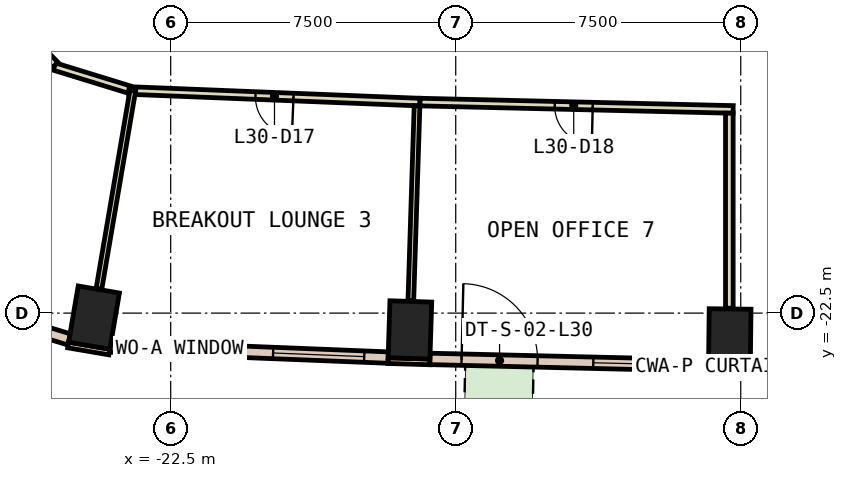
"""IFC4 building model, lengths in metres.
Left out: names, types, materials, properties, quantities, classifications, styles, units other than length and angle.
Written with IfcOpenShell. Run it as: python <this file> out.ifc"""

import sys

from ifc_helpers import new_model, si_unit, direction, frame, frame_2d, origin, origin_2d, place, context, subcontext, project, spatial, rectangle, extrude, element, fill, save


model = new_model("IFC4")
c1 = context("Model", 3, precision=1e-05, world=origin(), true_north=direction((0.0, 1.0)))
c2 = subcontext(c1, "Body", "Model", "MODEL_VIEW")
j1 = project(units=[si_unit("LENGTHUNIT", "METRE"), si_unit("PLANEANGLEUNIT", "RADIAN")], contexts=[c1])
p1 = place(None, origin())
s1 = spatial("IfcSite", under=j1, at=p1, CompositionType="ELEMENT")
p2 = place(p1, origin())
s2 = spatial("IfcBuilding", under=s1, at=p2, CompositionType="ELEMENT")
p3 = place(p2, frame((0.0, 0.0, 138.2)))
s3 = spatial("IfcBuildingStorey", under=s2, at=p3, CompositionType="ELEMENT", Elevation=138.2)
for number, where, z_axis, x_axis in (
    (1, (-24.518, -22.618, 0.0), (0.0, 0.0, 1.0), (-0.986, 0.168, 0.0)),
    (2, (-16.205, -22.942, 0.0), (0.0, 0.0, 1.0), (-0.999, 0.032, 0.0)),
    (3, (-7.789, -23.141, 0.0), (0.0, 0.0, 1.0), (-1.0, 0.012, 0.0)),
):
    element("IfcColumn", number, at=place(p3, frame(where, z_axis=z_axis, x_axis=x_axis)), inside=s3, PredefinedType="COLUMN", context=c2, shape_type="SweptSolid", body=[
        extrude(rectangle(XDim=1.1, YDim=1.5, at=origin_2d()), origin(), (0.0, 0.0, 1.0), 3.8),
    ])
p4 = place(p3, frame((-25.199, -23.339, 0.0), z_axis=(0.0, 0.0, 1.0), x_axis=(0.985800082077, -0.167923191299, 0.0)))
e4 = element("IfcWall", 4, at=p4, inside=s3, PredefinedType="STANDARD", context=c2, shape_type="SweptSolid", body=[
    extrude(rectangle(XDim=1.101, YDim=0.15, at=frame_2d((0.55, 0.0))), origin(), (0.0, 0.0, 1.0), 3.8),
])
p5 = place(p3, frame((-16.781, -23.75, 0.0), z_axis=(0.0, 0.0, 1.0), x_axis=(0.999523702549, -0.030860460829, 0.0)))
e5 = element("IfcWall", 5, at=p5, inside=s3, PredefinedType="STANDARD", context=c2, shape_type="SweptSolid", body=[
    extrude(rectangle(XDim=1.1, YDim=0.15, at=frame_2d((0.55, 0.0))), origin(), (0.0, 0.0, 1.0), 3.8),
])
p6 = place(p3, frame((-8.349, -23.96, 0.0), z_axis=(0.0, 0.0, 1.0), x_axis=(0.999940879068, -0.010873746799, 0.0)))
e6 = element("IfcWall", 6, at=p6, inside=s3, PredefinedType="STANDARD", context=c2, shape_type="SweptSolid", body=[
    extrude(rectangle(XDim=1.1, YDim=0.15, at=frame_2d((0.55, 0.0))), origin(), (0.0, 0.0, 1.0), 3.8),
])
p7 = place(p3, frame((-24.09, -23.378, 0.0), z_axis=(0.0, 0.0, 1.0), x_axis=(0.999203621229, -0.039901420066, 0.0)))
e7 = element("IfcWall", 7, at=p7, inside=s3, PredefinedType="STANDARD", context=c2, shape_type="SweptSolid", body=[
    extrude(rectangle(XDim=7.318, YDim=0.3, at=frame_2d((3.659, 0.0))), origin(), (0.0, 0.0, 1.0), 3.8),
])
p8 = place(p7, frame((0.629, 0.0, 0.9)))
e8 = element("IfcOpeningElement", 8, at=p8, cuts=e7, PredefinedType="OPENING", context=c2, shape_type="SweptSolid", body=[
    extrude(rectangle(XDim=2.4, YDim=2.6, at=frame_2d((1.2, 1.3))), frame((0.0, 0.16, 0.0), z_axis=(0.0, -1.0, 0.0), x_axis=(1.0, 0.0, 0.0)), (0.0, 0.0, 1.0), 0.32),
])
p9 = place(p7, frame((4.288, 0.0, 0.9)))
e9 = element("IfcOpeningElement", 9, at=p9, cuts=e7, PredefinedType="OPENING", context=c2, shape_type="SweptSolid", body=[
    extrude(rectangle(XDim=2.4, YDim=2.6, at=frame_2d((1.2, 1.3))), frame((0.0, 0.16, 0.0), z_axis=(0.0, -1.0, 0.0), x_axis=(1.0, 0.0, 0.0)), (0.0, 0.0, 1.0), 0.32),
])
p10 = place(p3, frame((-15.68, -23.705, 0.0), z_axis=(0.0, 0.0, 1.0), x_axis=(0.999722302867, -0.023565168146, 0.0)))
e10 = element("IfcWall", 10, at=p10, inside=s3, PredefinedType="STANDARD", context=c2, shape_type="SweptSolid", body=[
    extrude(rectangle(XDim=7.335, YDim=0.3, at=frame_2d((3.667, 0.0))), origin(), (0.0, 0.0, 1.0), 3.8),
])
p11 = place(p10, frame((0.834, 0.0, 0.0)))
e11 = element("IfcOpeningElement", 11, at=p11, cuts=e10, PredefinedType="OPENING", context=c2, shape_type="SweptSolid", body=[
    extrude(rectangle(XDim=2.0, YDim=2.4, at=frame_2d((1.0, 1.2))), frame((0.0, 0.16, 0.0), z_axis=(0.0, -1.0, 0.0), x_axis=(1.0, 0.0, 0.0)), (0.0, 0.0, 1.0), 0.32),
])
p12 = place(p10, frame((4.301, 0.0, 0.9)))
e12 = element("IfcOpeningElement", 12, at=p12, cuts=e10, PredefinedType="OPENING", context=c2, shape_type="SweptSolid", body=[
    extrude(rectangle(XDim=2.4, YDim=2.6, at=frame_2d((1.2, 1.3))), frame((0.0, 0.16, 0.0), z_axis=(0.0, -1.0, 0.0), x_axis=(1.0, 0.0, 0.0)), (0.0, 0.0, 1.0), 0.32),
])
p13 = place(p3, frame((-28.554, -22.154, 0.0), z_axis=(0.0, 0.0, 1.0), x_axis=(0.955874475611, -0.293775402094, 0.0)))
e13 = element("IfcWall", 13, at=p13, inside=s3, PredefinedType="STANDARD", context=c2, shape_type="SweptSolid", body=[
    extrude(rectangle(XDim=3.537, YDim=0.3, at=frame_2d((1.769, 0.0))), origin(), (0.0, 0.0, 1.0), 3.8),
])
p14 = place(p13, frame((1.069, 0.0, 0.9)))
e14 = element("IfcOpeningElement", 14, at=p14, cuts=e13, PredefinedType="OPENING", context=c2, shape_type="SweptSolid", body=[
    extrude(rectangle(XDim=1.4, YDim=2.6, at=frame_2d((0.7, 1.3))), frame((0.0, 0.16, 0.0), z_axis=(0.0, -1.0, 0.0), x_axis=(1.0, 0.0, 0.0)), (0.0, 0.0, 1.0), 0.32),
])
p15 = place(p3, frame((-23.594, -16.617, 0.0), z_axis=(0.0, 0.0, 1.0), x_axis=(-0.955896815358, 0.293702704087, 0.0)))
e15 = element("IfcWall", 15, at=p15, inside=s3, PredefinedType="PARTITIONING", context=c2, shape_type="SweptSolid", body=[
    extrude(rectangle(XDim=2.06, YDim=0.2, at=frame_2d((1.03, 0.0))), origin(), (0.0, 0.0, 1.0), 3.8),
])
p16 = place(p3, frame((-25.538, -15.97, 0.0), z_axis=(0.0, 0.0, 1.0), x_axis=(-0.698272822523, 0.715831729756, 0.0)))
e16 = element("IfcWall", 16, at=p16, inside=s3, PredefinedType="PARTITIONING", context=c2, shape_type="SweptSolid", body=[
    extrude(rectangle(XDim=1.196, YDim=0.2, at=frame_2d((0.598, 0.0))), origin(), (0.0, 0.0, 1.0), 3.8),
])
p17 = place(p3, frame((-15.94, -16.948, 0.0), z_axis=(0.0, 0.0, 1.0), x_axis=(-0.999203094545, 0.03991460699, 0.0)))
e17 = element("IfcWall", 17, at=p17, inside=s3, PredefinedType="PARTITIONING", context=c2, shape_type="SweptSolid", body=[
    extrude(rectangle(XDim=7.664, YDim=0.2, at=frame_2d((3.832, 0.0))), origin(), (0.0, 0.0, 1.0), 3.8),
])
p18 = place(p17, frame((3.332, 0.0, 0.0)))
e18 = element("IfcOpeningElement", 18, at=p18, cuts=e17, PredefinedType="OPENING", context=c2, shape_type="SweptSolid", body=[
    extrude(rectangle(XDim=1.0, YDim=2.1, at=frame_2d((0.5, 1.05))), frame((0.0, 0.11, 0.0), z_axis=(0.0, -1.0, 0.0), x_axis=(1.0, 0.0, 0.0)), (0.0, 0.0, 1.0), 0.22),
])
p19 = place(p3, frame((-7.7, -17.141, 0.0), z_axis=(0.0, 0.0, 1.0), x_axis=(-0.999722699727, 0.023548325865, 0.0)))
e19 = element("IfcWall", 19, at=p19, inside=s3, PredefinedType="PARTITIONING", context=c2, shape_type="SweptSolid", body=[
    extrude(rectangle(XDim=8.242, YDim=0.2, at=frame_2d((4.121, 0.0))), origin(), (0.0, 0.0, 1.0), 3.8),
])
p20 = place(p19, frame((3.696, 0.0, 0.0)))
e20 = element("IfcOpeningElement", 20, at=p20, cuts=e19, PredefinedType="OPENING", context=c2, shape_type="SweptSolid", body=[
    extrude(rectangle(XDim=1.0, YDim=2.1, at=frame_2d((0.5, 1.05))), frame((0.0, 0.11, 0.0), z_axis=(0.0, -1.0, 0.0), x_axis=(1.0, 0.0, 0.0)), (0.0, 0.0, 1.0), 0.22),
])
p21 = place(p3, frame((-7.8, -22.371, 0.0), z_axis=(0.0, 0.0, 1.0), x_axis=(0.0, 1.0, 0.0)))
e21 = element("IfcWall", 21, at=p21, inside=s3, PredefinedType="PARTITIONING", context=c2, shape_type="SweptSolid", body=[
    extrude(rectangle(XDim=5.132, YDim=0.2, at=frame_2d((2.566, 0.0))), origin(), (0.0, 0.0, 1.0), 3.8),
])
p22 = place(p3, frame((-23.498, -16.646, 0.0), z_axis=(0.0, 0.0, 1.0), x_axis=(-0.168275674737, -0.985739974482, 0.0)))
e22 = element("IfcWall", 22, at=p22, inside=s3, PredefinedType="PARTITIONING", context=c2, shape_type="SweptSolid", body=[
    extrude(rectangle(XDim=5.288, YDim=0.15, at=frame_2d((2.644, 0.0))), origin(), (0.0, 0.0, 1.0), 3.8),
])
p23 = place(p3, frame((-16.018, -17.045, 0.0), z_axis=(0.0, 0.0, 1.0), x_axis=(-0.031744385759, -0.999496019988, 0.0)))
e23 = element("IfcWall", 23, at=p23, inside=s3, PredefinedType="PARTITIONING", context=c2, shape_type="SweptSolid", body=[
    extrude(rectangle(XDim=5.13, YDim=0.15, at=frame_2d((2.565, 0.0))), origin(), (0.0, 0.0, 1.0), 3.8),
])
p24 = place(p8, origin())
e24 = element("IfcWindow", 24, at=p24, inside=s3, PartitioningType="SINGLE_PANEL", PredefinedType="WINDOW", context=c2, shape_type="SweptSolid", body=[
    extrude(rectangle(XDim=2.4, YDim=2.6, at=frame_2d((1.2, 1.3))), frame((0.0, 0.03, 0.0), z_axis=(0.0, -1.0, 0.0), x_axis=(1.0, 0.0, 0.0)), (0.0, 0.0, 1.0), 0.06),
])
fill(e8, e24)
p25 = place(p9, origin())
e25 = element("IfcWindow", 25, at=p25, inside=s3, PartitioningType="SINGLE_PANEL", PredefinedType="WINDOW", context=c2, shape_type="SweptSolid", body=[
    extrude(rectangle(XDim=2.4, YDim=2.6, at=frame_2d((1.2, 1.3))), frame((0.0, 0.03, 0.0), z_axis=(0.0, -1.0, 0.0), x_axis=(1.0, 0.0, 0.0)), (0.0, 0.0, 1.0), 0.06),
])
fill(e9, e25)
p26 = place(p11, origin())
e26 = element("IfcDoor", 26, at=p26, inside=s3, OperationType="SLIDING_TO_LEFT", PredefinedType="DOOR", context=c2, shape_type="SweptSolid", body=[
    extrude(rectangle(XDim=2.0, YDim=2.4, at=frame_2d((1.0, 1.2))), frame((0.0, 0.025, 0.0), z_axis=(0.0, -1.0, 0.0), x_axis=(1.0, 0.0, 0.0)), (0.0, 0.0, 1.0), 0.05),
])
fill(e11, e26)
p27 = place(p12, origin())
e27 = element("IfcWindow", 27, at=p27, inside=s3, PartitioningType="SINGLE_PANEL", PredefinedType="WINDOW", context=c2, shape_type="SweptSolid", body=[
    extrude(rectangle(XDim=2.4, YDim=2.6, at=frame_2d((1.2, 1.3))), frame((0.0, 0.03, 0.0), z_axis=(0.0, -1.0, 0.0), x_axis=(1.0, 0.0, 0.0)), (0.0, 0.0, 1.0), 0.06),
])
fill(e12, e27)
p28 = place(p18, origin())
e28 = element("IfcDoor", 28, at=p28, inside=s3, OperationType="SINGLE_SWING_LEFT", PredefinedType="DOOR", context=c2, shape_type="SweptSolid", body=[
    extrude(rectangle(XDim=1.0, YDim=2.1, at=frame_2d((0.5, 1.05))), frame((0.0, 0.025, 0.0), z_axis=(0.0, -1.0, 0.0), x_axis=(1.0, 0.0, 0.0)), (0.0, 0.0, 1.0), 0.05),
])
fill(e18, e28)
p29 = place(p20, origin())
e29 = element("IfcDoor", 29, at=p29, inside=s3, OperationType="SINGLE_SWING_RIGHT", PredefinedType="DOOR", context=c2, shape_type="SweptSolid", body=[
    extrude(rectangle(XDim=1.0, YDim=2.1, at=frame_2d((0.5, 1.05))), frame((0.0, 0.025, 0.0), z_axis=(0.0, -1.0, 0.0), x_axis=(1.0, 0.0, 0.0)), (0.0, 0.0, 1.0), 0.05),
])
fill(e20, e29)
save(model, sys.argv[1])
